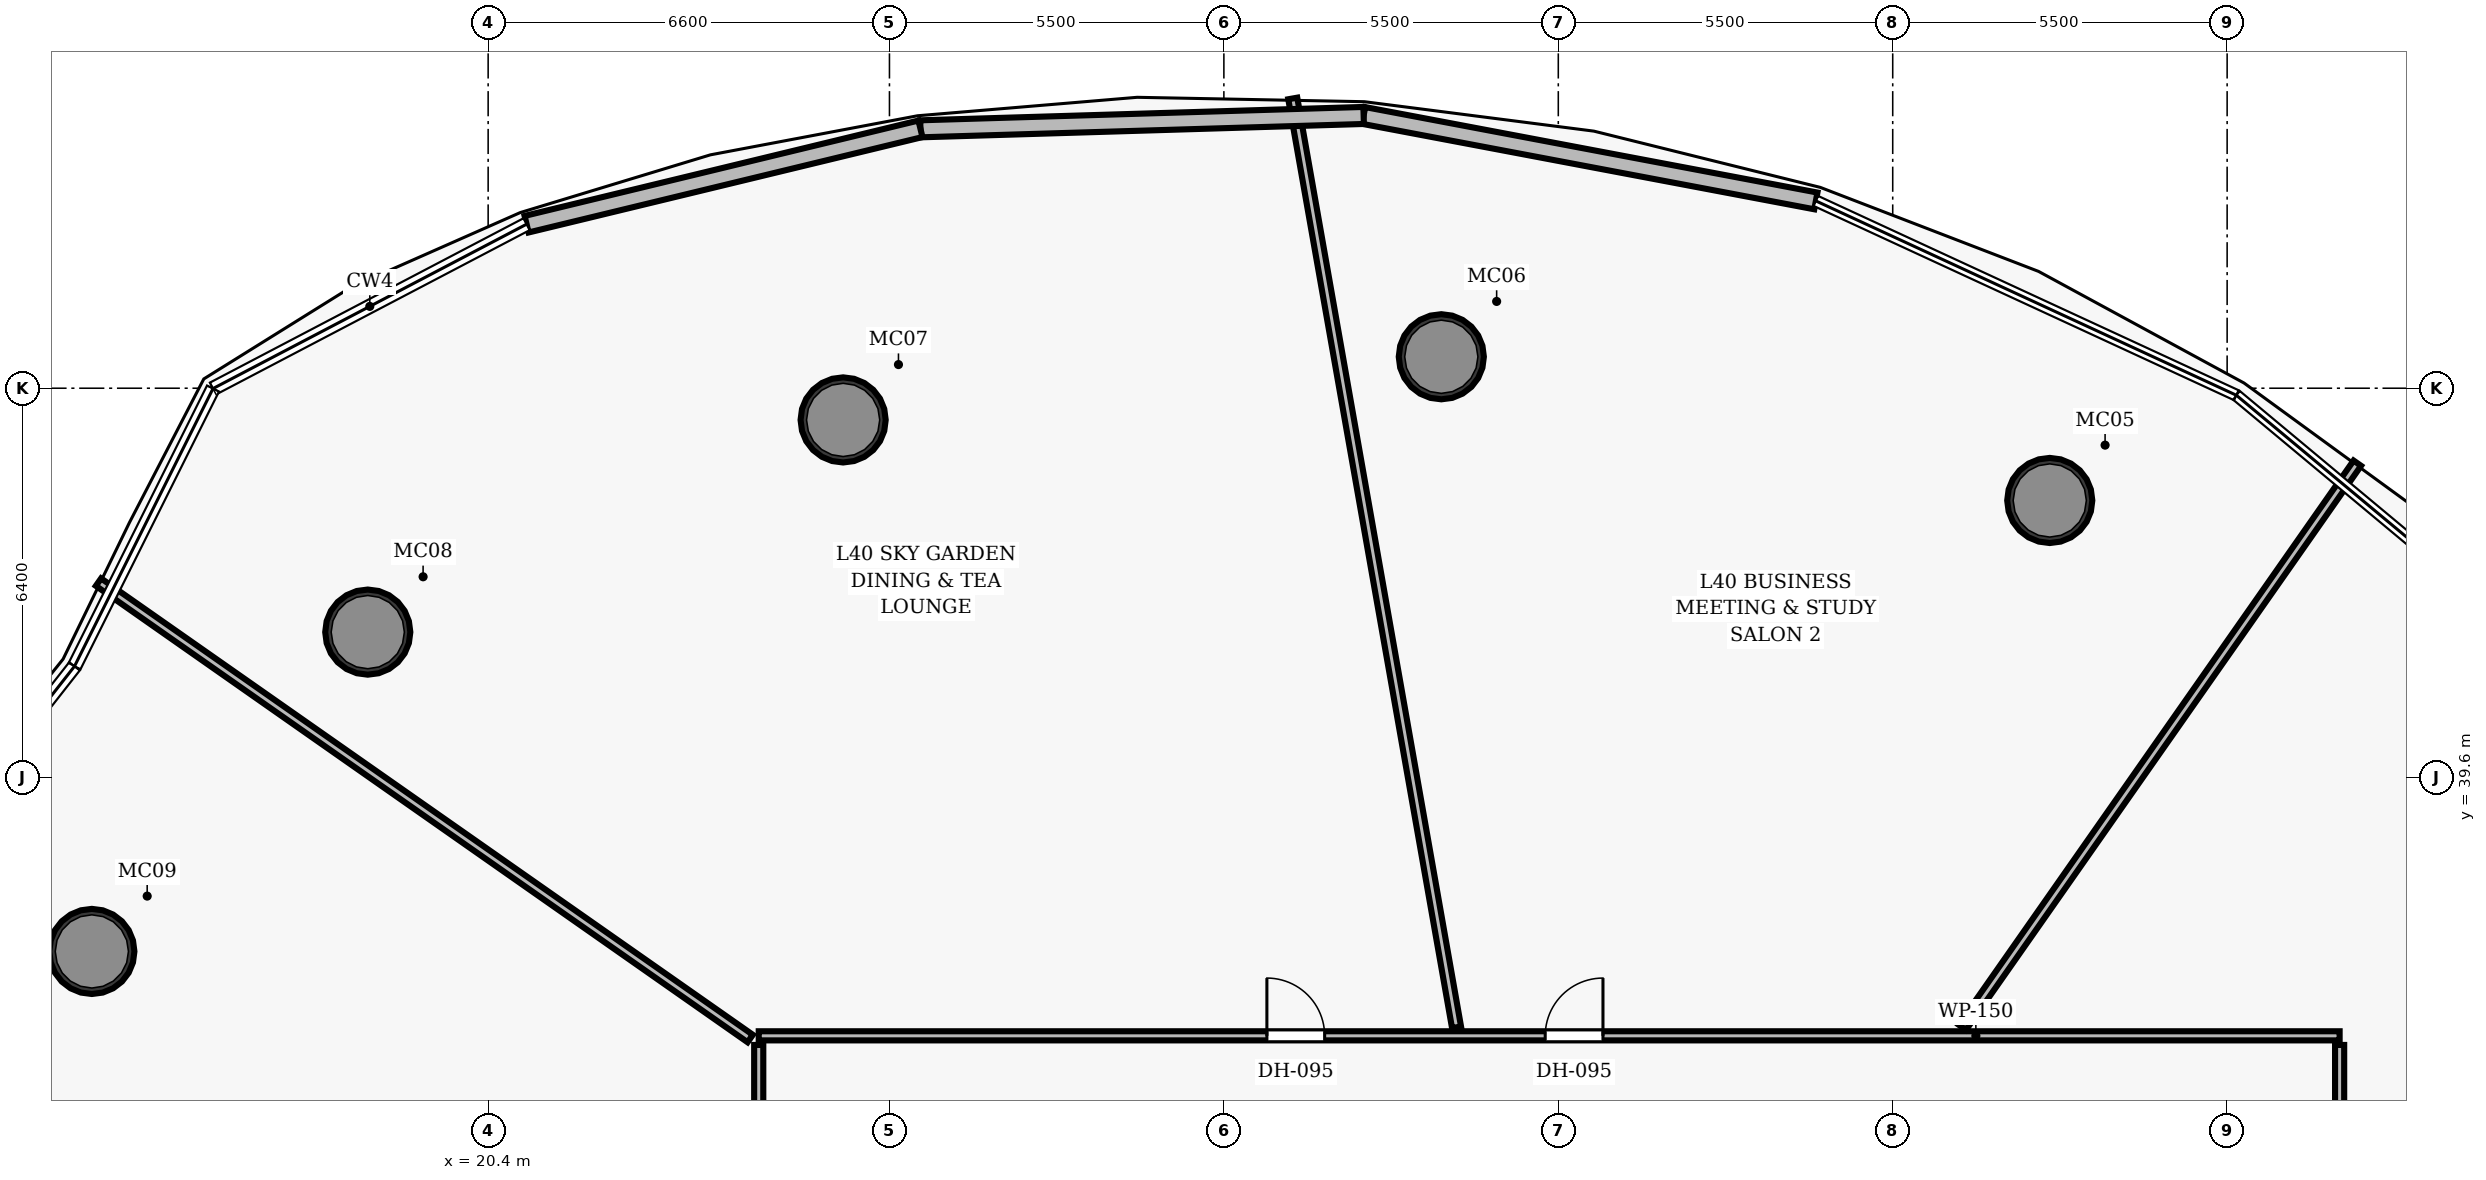
"""IFC4 building model, lengths in metres.
Left out: names, types, materials, properties, quantities, classifications, styles, units other than length and angle.
Written with IfcOpenShell. Run it as: python <this file> out.ifc"""

import sys

from ifc_helpers import new_model, si_unit, direction, frame, frame_2d, origin, origin_2d, place, context, subcontext, project, spatial, rectangle, hollow_circle, extrude, element, fill, save


model = new_model("IFC4")
c1 = context("Model", 3, precision=1e-05, world=origin(), true_north=direction((0.0, 1.0)))
c2 = subcontext(c1, "Body", "Model", "MODEL_VIEW")
j1 = project(units=[si_unit("LENGTHUNIT", "METRE"), si_unit("PLANEANGLEUNIT", "RADIAN")], contexts=[c1])
p1 = place(None, origin())
s1 = spatial("IfcSite", under=j1, at=p1, CompositionType="ELEMENT")
p2 = place(p1, origin())
s2 = spatial("IfcBuilding", under=s1, at=p2, CompositionType="ELEMENT")
p3 = place(p2, frame((0.0, 0.0, 158.8)))
s3 = spatial("IfcBuildingStorey", under=s2, at=p3, CompositionType="ELEMENT", Elevation=158.8)
for number, where, z_axis, x_axis in (
    (1, (46.083, 44.154, 0.0), (0.0, 0.0, 1.0), (1.0, 0.0, 0.0)),
    (2, (36.076, 46.517, 0.0), (0.0, 0.0, 1.0), (1.0, 0.0, 0.0)),
    (3, (26.238, 45.479, 0.0), (0.0, 0.0, 1.0), (1.0, 0.0, 0.0)),
    (4, (18.42, 41.989, 0.0), (0.0, 0.0, 1.0), (1.0, 0.0, 0.0)),
    (5, (13.882, 36.738, 0.0), (0.0, 0.0, 1.0), (1.0, 0.0, 0.0)),
):
    element("IfcColumn", number, at=place(p3, frame(where, z_axis=z_axis, x_axis=x_axis)), inside=s3, PredefinedType="COLUMN", context=c2, shape_type="SweptSolid", body=[
        extrude(hollow_circle(Radius=0.7, WallThickness=0.055, at=origin_2d()), origin(), (0.0, 0.0, 1.0), 3.5),
    ])
p4 = place(p3, frame((24.85, 35.35, 0.0), z_axis=(0.0, 0.0, 1.0), x_axis=(1.0, 0.0, 0.0)))
e6 = element("IfcWall", 6, at=p4, inside=s3, PredefinedType="PARTITIONING", context=c2, shape_type="SweptSolid", body=[
    extrude(rectangle(XDim=26.0, YDim=0.15, at=frame_2d((13.0, 0.0))), origin(), (0.0, 0.0, 1.0), 2.675),
])
p5 = place(p4, frame((12.935, 0.0, 0.0)))
e7 = element("IfcOpeningElement", 7, at=p5, cuts=e6, PredefinedType="OPENING", context=c2, shape_type="SweptSolid", body=[
    extrude(rectangle(XDim=0.95, YDim=2.15, at=frame_2d((0.475, 1.075))), frame((0.0, 0.085, 0.0), z_axis=(0.0, -1.0, 0.0), x_axis=(1.0, 0.0, 0.0)), (0.0, 0.0, 1.0), 0.17),
])
p6 = place(p4, frame((8.357, 0.0, 0.0)))
e8 = element("IfcOpeningElement", 8, at=p6, cuts=e6, PredefinedType="OPENING", context=c2, shape_type="SweptSolid", body=[
    extrude(rectangle(XDim=0.95, YDim=2.15, at=frame_2d((0.475, 1.075))), frame((0.0, 0.085, 0.0), z_axis=(0.0, -1.0, 0.0), x_axis=(1.0, 0.0, 0.0)), (0.0, 0.0, 1.0), 0.17),
])
p7 = place(p3, frame((24.85, 27.08, 0.0), z_axis=(0.0, 0.0, 1.0), x_axis=(0.0, 1.0, 0.0)))
e9 = element("IfcWall", 9, at=p7, inside=s3, PredefinedType="PARTITIONING", context=c2, shape_type="SweptSolid", body=[
    extrude(rectangle(XDim=8.12, YDim=0.15, at=frame_2d((4.06, 0.0))), origin(), (0.0, 0.0, 1.0), 2.675),
])
p8 = place(p7, frame((3.585, 0.0, 0.0)))
e10 = element("IfcOpeningElement", 10, at=p8, cuts=e9, PredefinedType="OPENING", context=c2, shape_type="SweptSolid", body=[
    extrude(rectangle(XDim=0.95, YDim=2.15, at=frame_2d((0.475, 1.075))), frame((0.0, 0.085, 0.0), z_axis=(0.0, -1.0, 0.0), x_axis=(1.0, 0.0, 0.0)), (0.0, 0.0, 1.0), 0.17),
])
p9 = place(p3, frame((50.85, 27.08, 0.0), z_axis=(0.0, 0.0, 1.0), x_axis=(0.0, 1.0, 0.0)))
e11 = element("IfcWall", 11, at=p9, inside=s3, PredefinedType="PARTITIONING", context=c2, shape_type="SweptSolid", body=[
    extrude(rectangle(XDim=8.12, YDim=0.15, at=frame_2d((4.06, 0.0))), origin(), (0.0, 0.0, 1.0), 2.675),
])
p10 = place(p9, frame((2.238, 0.0, 0.0)))
e12 = element("IfcOpeningElement", 12, at=p10, cuts=e11, PredefinedType="OPENING", context=c2, shape_type="SweptSolid", body=[
    extrude(rectangle(XDim=0.95, YDim=2.15, at=frame_2d((0.475, 1.075))), frame((0.0, 0.085, 0.0), z_axis=(0.0, -1.0, 0.0), x_axis=(1.0, 0.0, 0.0)), (0.0, 0.0, 1.0), 0.17),
])
p11 = place(p3, frame((44.645, 35.49, 0.0), z_axis=(0.0, 0.0, 1.0), x_axis=(0.573578078788, 0.81915089424, 0.0)))
e13 = element("IfcWall", 13, at=p11, inside=s3, PredefinedType="PARTITIONING", context=c2, shape_type="SweptSolid", body=[
    extrude(rectangle(XDim=11.325, YDim=0.15, at=frame_2d((5.663, 0.0))), origin(), (0.0, 0.0, 1.0), 2.675),
])
p12 = place(p3, frame((36.327, 35.49, 0.0), z_axis=(0.0, 0.0, 1.0), x_axis=(-0.173641666611, 0.984808901065, 0.0)))
e14 = element("IfcWall", 14, at=p12, inside=s3, PredefinedType="PARTITIONING", context=c2, shape_type="SweptSolid", body=[
    extrude(rectangle(XDim=15.511, YDim=0.15, at=frame_2d((7.755, 0.0))), origin(), (0.0, 0.0, 1.0), 2.675),
])
p13 = place(p3, frame((24.71, 35.306, 0.0), z_axis=(0.0, 0.0, 1.0), x_axis=(-0.819153898842, 0.573573787766, 0.0)))
e15 = element("IfcWall", 15, at=p13, inside=s3, PredefinedType="PARTITIONING", context=c2, shape_type="SweptSolid", body=[
    extrude(rectangle(XDim=13.085, YDim=0.15, at=frame_2d((6.542, 0.0))), origin(), (0.0, 0.0, 1.0), 2.675),
])
p14 = place(p3, frame((34.799, 50.486, 0.0), z_axis=(0.0, 0.0, 1.0), x_axis=(0.982608280237, -0.185690515669, 0.0)))
e16 = element("IfcWall", 16, at=p14, inside=s3, PredefinedType="SOLIDWALL", context=c2, shape_type="SweptSolid", body=[
    extrude(rectangle(XDim=7.569, YDim=0.28, at=frame_2d((3.785, 0.0))), origin(), (0.0, 0.0, 1.0), 3.26),
])
p15 = place(p3, frame((27.51, 50.266, 0.0), z_axis=(0.0, 0.0, 1.0), x_axis=(0.99954690519, 0.030099573517, 0.0)))
e17 = element("IfcWall", 17, at=p15, inside=s3, PredefinedType="SOLIDWALL", context=c2, shape_type="SweptSolid", body=[
    extrude(rectangle(XDim=7.292, YDim=0.28, at=frame_2d((3.646, 0.0))), origin(), (0.0, 0.0, 1.0), 3.26),
])
p16 = place(p3, frame((21.032, 48.697, 0.0), z_axis=(0.0, 0.0, 1.0), x_axis=(0.971902437422, 0.23538405242, 0.0)))
e18 = element("IfcWall", 18, at=p16, inside=s3, PredefinedType="SOLIDWALL", context=c2, shape_type="SweptSolid", body=[
    extrude(rectangle(XDim=6.665, YDim=0.28, at=frame_2d((3.333, 0.0))), origin(), (0.0, 0.0, 1.0), 3.26),
])
p17 = place(p5, origin())
e19 = element("IfcDoor", 19, at=p17, inside=s3, OperationType="SINGLE_SWING_RIGHT", PredefinedType="DOOR", context=c2, shape_type="SweptSolid", body=[
    extrude(rectangle(XDim=0.95, YDim=2.15, at=frame_2d((0.475, 1.075))), frame((0.0, 0.025, 0.0), z_axis=(0.0, -1.0, 0.0), x_axis=(1.0, 0.0, 0.0)), (0.0, 0.0, 1.0), 0.05),
])
fill(e7, e19)
p18 = place(p6, origin())
e20 = element("IfcDoor", 20, at=p18, inside=s3, OperationType="SINGLE_SWING_LEFT", PredefinedType="DOOR", context=c2, shape_type="SweptSolid", body=[
    extrude(rectangle(XDim=0.95, YDim=2.15, at=frame_2d((0.475, 1.075))), frame((0.0, 0.025, 0.0), z_axis=(0.0, -1.0, 0.0), x_axis=(1.0, 0.0, 0.0)), (0.0, 0.0, 1.0), 0.05),
])
fill(e8, e20)
save(model, sys.argv[1])
